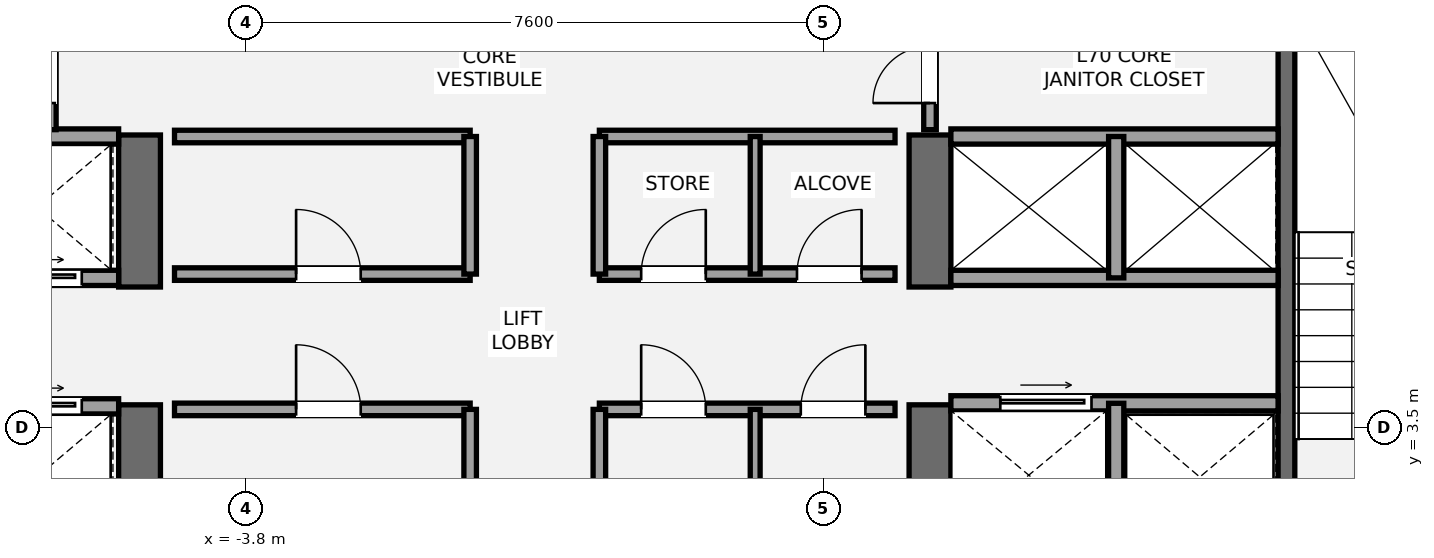
"""IFC4 building model, lengths in metres.
Left out: names, types, materials, properties, quantities, classifications, styles, units other than length and angle.
Written with IfcOpenShell. Run it as: python <this file> out.ifc"""

import sys

from ifc_helpers import new_model, si_unit, direction, frame, frame_2d, origin, place, context, subcontext, project, spatial, rectangle, extrude, element, fill, save


model = new_model("IFC4")
c1 = context("Model", 3, precision=1e-05, world=origin(), true_north=direction((0.0, 1.0)))
c2 = subcontext(c1, "Body", "Model", "MODEL_VIEW")
j1 = project(units=[si_unit("LENGTHUNIT", "METRE"), si_unit("PLANEANGLEUNIT", "RADIAN")], contexts=[c1])
p1 = place(None, origin())
s1 = spatial("IfcSite", under=j1, at=p1, CompositionType="ELEMENT")
p2 = place(p1, origin())
s2 = spatial("IfcBuilding", under=s1, at=p2, CompositionType="ELEMENT")
p3 = place(p2, frame((0.0, 0.0, 247.8)))
s3 = spatial("IfcBuildingStorey", under=s2, at=p3, CompositionType="ELEMENT", Elevation=247.8)
p4 = place(p3, frame((-5.2, 1.3, 0.0), z_axis=(0.0, 0.0, 1.0), x_axis=(0.0, 1.0, 0.0)))
e1 = element("IfcWall", 1, at=p4, inside=s3, PredefinedType="SHEAR", context=c2, shape_type="SweptSolid", body=[
    extrude(rectangle(XDim=2.5, YDim=0.55, at=frame_2d((1.25, 0.0))), origin(), (0.0, 0.0, 1.0), 3.15),
])
p5 = place(p3, frame((-5.2, 5.35, 0.0), z_axis=(0.0, 0.0, 1.0), x_axis=(0.0, 1.0, 0.0)))
e2 = element("IfcWall", 2, at=p5, inside=s3, PredefinedType="SHEAR", context=c2, shape_type="SweptSolid", body=[
    extrude(rectangle(XDim=2.0, YDim=0.55, at=frame_2d((1.0, 0.0))), origin(), (0.0, 0.0, 1.0), 3.15),
])
p6 = place(p3, frame((5.2, 1.3, 0.0), z_axis=(0.0, 0.0, 1.0), x_axis=(0.0, 1.0, 0.0)))
e3 = element("IfcWall", 3, at=p6, inside=s3, PredefinedType="SHEAR", context=c2, shape_type="SweptSolid", body=[
    extrude(rectangle(XDim=2.5, YDim=0.55, at=frame_2d((1.25, 0.0))), origin(), (0.0, 0.0, 1.0), 3.15),
])
p7 = place(p3, frame((5.2, 5.35, 0.0), z_axis=(0.0, 0.0, 1.0), x_axis=(0.0, 1.0, 0.0)))
e4 = element("IfcWall", 4, at=p7, inside=s3, PredefinedType="SHEAR", context=c2, shape_type="SweptSolid", body=[
    extrude(rectangle(XDim=2.0, YDim=0.55, at=frame_2d((1.0, 0.0))), origin(), (0.0, 0.0, 1.0), 3.15),
])
p8 = place(p3, frame((9.89, 1.85, 0.0), z_axis=(0.0, 0.0, 1.0), x_axis=(0.0, 1.0, 0.0)))
e5 = element("IfcWall", 5, at=p8, inside=s3, PredefinedType="SHEAR", context=c2, shape_type="SweptSolid", body=[
    extrude(rectangle(XDim=7.15, YDim=0.22, at=frame_2d((3.575, 0.0))), origin(), (0.0, 0.0, 1.0), 3.15),
])
p9 = place(p3, frame((-9.78, 3.78, 0.0), z_axis=(0.0, 0.0, 1.0), x_axis=(1.0, 0.0, 0.0)))
e6 = element("IfcWall", 6, at=p9, inside=s3, PredefinedType="SOLIDWALL", context=c2, shape_type="SweptSolid", body=[
    extrude(rectangle(XDim=4.305, YDim=0.2, at=frame_2d((2.152, 0.0))), origin(), (0.0, 0.0, 1.0), 2.97),
])
p10 = place(p9, frame((2.72, 0.0, 0.0)))
e7 = element("IfcOpeningElement", 7, at=p10, cuts=e6, PredefinedType="OPENING", context=c2, shape_type="SweptSolid", body=[
    extrude(rectangle(XDim=1.1, YDim=2.2, at=frame_2d((0.55, 1.1))), frame((0.0, 0.11, 0.0), z_axis=(0.0, -1.0, 0.0), x_axis=(1.0, 0.0, 0.0)), (0.0, 0.0, 1.0), 0.22),
])
p11 = place(p3, frame((-9.78, 5.47, 0.0), z_axis=(0.0, 0.0, 1.0), x_axis=(1.0, 0.0, 0.0)))
e8 = element("IfcWall", 8, at=p11, inside=s3, PredefinedType="SOLIDWALL", context=c2, shape_type="SweptSolid", body=[
    extrude(rectangle(XDim=4.305, YDim=0.2, at=frame_2d((2.152, 0.0))), origin(), (0.0, 0.0, 1.0), 2.97),
])
p12 = place(p11, frame((0.55, 0.0, 0.0)))
e9 = element("IfcOpeningElement", 9, at=p12, cuts=e8, PredefinedType="OPENING", context=c2, shape_type="SweptSolid", body=[
    extrude(rectangle(XDim=1.1, YDim=2.2, at=frame_2d((0.55, 1.1))), frame((0.0, 0.11, 0.0), z_axis=(0.0, -1.0, 0.0), x_axis=(1.0, 0.0, 0.0)), (0.0, 0.0, 1.0), 0.22),
])
p13 = place(p11, frame((2.72, 0.0, 0.0)))
e10 = element("IfcOpeningElement", 10, at=p13, cuts=e8, PredefinedType="OPENING", context=c2, shape_type="SweptSolid", body=[
    extrude(rectangle(XDim=1.1, YDim=2.2, at=frame_2d((0.55, 1.1))), frame((0.0, 0.11, 0.0), z_axis=(0.0, -1.0, 0.0), x_axis=(1.0, 0.0, 0.0)), (0.0, 0.0, 1.0), 0.22),
])
p14 = place(p3, frame((-9.78, 7.33, 0.0), z_axis=(0.0, 0.0, 1.0), x_axis=(1.0, 0.0, 0.0)))
e11 = element("IfcWall", 11, at=p14, inside=s3, PredefinedType="SOLIDWALL", context=c2, shape_type="SweptSolid", body=[
    extrude(rectangle(XDim=4.305, YDim=0.2, at=frame_2d((2.152, 0.0))), origin(), (0.0, 0.0, 1.0), 2.97),
])
p15 = place(p3, frame((5.475, 3.82, 0.0), z_axis=(0.0, 0.0, 1.0), x_axis=(1.0, 0.0, 0.0)))
e12 = element("IfcWall", 12, at=p15, inside=s3, PredefinedType="SOLIDWALL", context=c2, shape_type="SweptSolid", body=[
    extrude(rectangle(XDim=4.305, YDim=0.2, at=frame_2d((2.152, 0.0))), origin(), (0.0, 0.0, 1.0), 2.97),
])
p16 = place(p15, frame((0.65, 0.0, 0.0)))
e13 = element("IfcOpeningElement", 13, at=p16, cuts=e12, PredefinedType="OPENING", context=c2, shape_type="SweptSolid", body=[
    extrude(rectangle(XDim=1.2, YDim=2.2, at=frame_2d((0.6, 1.1))), frame((0.0, 0.11, 0.0), z_axis=(0.0, -1.0, 0.0), x_axis=(1.0, 0.0, 0.0)), (0.0, 0.0, 1.0), 0.22),
])
p17 = place(p3, frame((7.65, 1.85, 0.0), z_axis=(0.0, 0.0, 1.0), x_axis=(0.0, 1.0, 0.0)))
e14 = element("IfcWall", 14, at=p17, inside=s3, PredefinedType="SOLIDWALL", context=c2, shape_type="SweptSolid", body=[
    extrude(rectangle(XDim=1.97, YDim=0.2, at=frame_2d((0.985, 0.0))), origin(), (0.0, 0.0, 1.0), 2.97),
])
for number, where, z_axis, x_axis in (
    (15, (5.475, 5.47, 0.0), (0.0, 0.0, 1.0), (1.0, 0.0, 0.0)),
    (16, (5.475, 7.33, 0.0), (0.0, 0.0, 1.0), (1.0, 0.0, 0.0)),
):
    element("IfcWall", number, at=place(p3, frame(where, z_axis=z_axis, x_axis=x_axis)), inside=s3, PredefinedType="SOLIDWALL", context=c2, shape_type="SweptSolid", body=[
        extrude(rectangle(XDim=4.305, YDim=0.2, at=frame_2d((2.152, 0.0))), origin(), (0.0, 0.0, 1.0), 2.97),
    ])
p18 = place(p3, frame((7.65, 5.47, 0.0), z_axis=(0.0, 0.0, 1.0), x_axis=(0.0, 1.0, 0.0)))
e17 = element("IfcWall", 17, at=p18, inside=s3, PredefinedType="SOLIDWALL", context=c2, shape_type="SweptSolid", body=[
    extrude(rectangle(XDim=1.86, YDim=0.2, at=frame_2d((0.93, 0.0))), origin(), (0.0, 0.0, 1.0), 2.97),
])
p19 = place(p3, frame((-4.74, 3.74, 0.0), z_axis=(0.0, 0.0, 1.0), x_axis=(1.0, 0.0, 0.0)))
e18 = element("IfcWall", 18, at=p19, inside=s3, PredefinedType="PARTITIONING", context=c2, shape_type="SweptSolid", body=[
    extrude(rectangle(XDim=3.89, YDim=0.165, at=frame_2d((1.945, 0.0))), origin(), (0.0, 0.0, 1.0), 2.97),
])
p20 = place(p19, frame((1.6, 0.0, 0.0)))
e19 = element("IfcOpeningElement", 19, at=p20, cuts=e18, PredefinedType="OPENING", context=c2, shape_type="SweptSolid", body=[
    extrude(rectangle(XDim=0.85, YDim=2.1, at=frame_2d((0.425, 1.05))), frame((0.0, 0.093, 0.0), z_axis=(0.0, -1.0, 0.0), x_axis=(1.0, 0.0, 0.0)), (0.0, 0.0, 1.0), 0.185),
])
p21 = place(p3, frame((-0.85, 1.92, 0.0), z_axis=(0.0, 0.0, 1.0), x_axis=(0.0, 1.0, 0.0)))
e20 = element("IfcWall", 20, at=p21, inside=s3, PredefinedType="PARTITIONING", context=c2, shape_type="SweptSolid", body=[
    extrude(rectangle(XDim=1.82, YDim=0.165, at=frame_2d((0.91, 0.0))), origin(), (0.0, 0.0, 1.0), 2.97),
])
p22 = place(p3, frame((0.85, 3.74, 0.0), z_axis=(0.0, 0.0, 1.0), x_axis=(1.0, 0.0, 0.0)))
e21 = element("IfcWall", 21, at=p22, inside=s3, PredefinedType="PARTITIONING", context=c2, shape_type="SweptSolid", body=[
    extrude(rectangle(XDim=3.89, YDim=0.165, at=frame_2d((1.945, 0.0))), origin(), (0.0, 0.0, 1.0), 2.97),
])
p23 = place(p22, frame((0.55, 0.0, 0.0)))
e22 = element("IfcOpeningElement", 22, at=p23, cuts=e21, PredefinedType="OPENING", context=c2, shape_type="SweptSolid", body=[
    extrude(rectangle(XDim=0.85, YDim=2.1, at=frame_2d((0.425, 1.05))), frame((0.0, 0.093, 0.0), z_axis=(0.0, -1.0, 0.0), x_axis=(1.0, 0.0, 0.0)), (0.0, 0.0, 1.0), 0.185),
])
p24 = place(p22, frame((2.65, 0.0, 0.0)))
e23 = element("IfcOpeningElement", 23, at=p24, cuts=e21, PredefinedType="OPENING", context=c2, shape_type="SweptSolid", body=[
    extrude(rectangle(XDim=0.85, YDim=2.1, at=frame_2d((0.425, 1.05))), frame((0.0, 0.093, 0.0), z_axis=(0.0, -1.0, 0.0), x_axis=(1.0, 0.0, 0.0)), (0.0, 0.0, 1.0), 0.185),
])
p25 = place(p3, frame((0.85, 1.92, 0.0), z_axis=(0.0, 0.0, 1.0), x_axis=(0.0, 1.0, 0.0)))
e24 = element("IfcWall", 24, at=p25, inside=s3, PredefinedType="PARTITIONING", context=c2, shape_type="SweptSolid", body=[
    extrude(rectangle(XDim=1.82, YDim=0.165, at=frame_2d((0.91, 0.0))), origin(), (0.0, 0.0, 1.0), 2.97),
])
p26 = place(p3, frame((2.9, 1.92, 0.0), z_axis=(0.0, 0.0, 1.0), x_axis=(0.0, 1.0, 0.0)))
e25 = element("IfcWall", 25, at=p26, inside=s3, PredefinedType="PARTITIONING", context=c2, shape_type="SweptSolid", body=[
    extrude(rectangle(XDim=1.82, YDim=0.13, at=frame_2d((0.91, 0.0))), origin(), (0.0, 0.0, 1.0), 2.97),
])
p27 = place(p3, frame((-4.74, 5.52, 0.0), z_axis=(0.0, 0.0, 1.0), x_axis=(1.0, 0.0, 0.0)))
e26 = element("IfcWall", 26, at=p27, inside=s3, PredefinedType="PARTITIONING", context=c2, shape_type="SweptSolid", body=[
    extrude(rectangle(XDim=3.89, YDim=0.165, at=frame_2d((1.945, 0.0))), origin(), (0.0, 0.0, 1.0), 2.97),
])
p28 = place(p27, frame((1.6, 0.0, 0.0)))
e27 = element("IfcOpeningElement", 27, at=p28, cuts=e26, PredefinedType="OPENING", context=c2, shape_type="SweptSolid", body=[
    extrude(rectangle(XDim=0.85, YDim=2.1, at=frame_2d((0.425, 1.05))), frame((0.0, 0.093, 0.0), z_axis=(0.0, -1.0, 0.0), x_axis=(1.0, 0.0, 0.0)), (0.0, 0.0, 1.0), 0.185),
])
p29 = place(p3, frame((-4.74, 7.33, 0.0), z_axis=(0.0, 0.0, 1.0), x_axis=(1.0, 0.0, 0.0)))
e28 = element("IfcWall", 28, at=p29, inside=s3, PredefinedType="PARTITIONING", context=c2, shape_type="SweptSolid", body=[
    extrude(rectangle(XDim=3.89, YDim=0.165, at=frame_2d((1.945, 0.0))), origin(), (0.0, 0.0, 1.0), 2.97),
])
p30 = place(p3, frame((-0.85, 5.52, 0.0), z_axis=(0.0, 0.0, 1.0), x_axis=(0.0, 1.0, 0.0)))
e29 = element("IfcWall", 29, at=p30, inside=s3, PredefinedType="PARTITIONING", context=c2, shape_type="SweptSolid", body=[
    extrude(rectangle(XDim=1.81, YDim=0.165, at=frame_2d((0.905, 0.0))), origin(), (0.0, 0.0, 1.0), 2.97),
])
p31 = place(p3, frame((0.85, 5.52, 0.0), z_axis=(0.0, 0.0, 1.0), x_axis=(1.0, 0.0, 0.0)))
e30 = element("IfcWall", 30, at=p31, inside=s3, PredefinedType="PARTITIONING", context=c2, shape_type="SweptSolid", body=[
    extrude(rectangle(XDim=3.89, YDim=0.165, at=frame_2d((1.945, 0.0))), origin(), (0.0, 0.0, 1.0), 2.97),
])
p32 = place(p31, frame((0.55, 0.0, 0.0)))
e31 = element("IfcOpeningElement", 31, at=p32, cuts=e30, PredefinedType="OPENING", context=c2, shape_type="SweptSolid", body=[
    extrude(rectangle(XDim=0.85, YDim=2.1, at=frame_2d((0.425, 1.05))), frame((0.0, 0.093, 0.0), z_axis=(0.0, -1.0, 0.0), x_axis=(1.0, 0.0, 0.0)), (0.0, 0.0, 1.0), 0.185),
])
p33 = place(p31, frame((2.6, 0.0, 0.0)))
e32 = element("IfcOpeningElement", 32, at=p33, cuts=e30, PredefinedType="OPENING", context=c2, shape_type="SweptSolid", body=[
    extrude(rectangle(XDim=0.85, YDim=2.1, at=frame_2d((0.425, 1.05))), frame((0.0, 0.093, 0.0), z_axis=(0.0, -1.0, 0.0), x_axis=(1.0, 0.0, 0.0)), (0.0, 0.0, 1.0), 0.185),
])
p34 = place(p3, frame((0.85, 7.33, 0.0), z_axis=(0.0, 0.0, 1.0), x_axis=(1.0, 0.0, 0.0)))
e33 = element("IfcWall", 33, at=p34, inside=s3, PredefinedType="PARTITIONING", context=c2, shape_type="SweptSolid", body=[
    extrude(rectangle(XDim=3.89, YDim=0.165, at=frame_2d((1.945, 0.0))), origin(), (0.0, 0.0, 1.0), 2.97),
])
p35 = place(p3, frame((0.85, 5.52, 0.0), z_axis=(0.0, 0.0, 1.0), x_axis=(0.0, 1.0, 0.0)))
e34 = element("IfcWall", 34, at=p35, inside=s3, PredefinedType="PARTITIONING", context=c2, shape_type="SweptSolid", body=[
    extrude(rectangle(XDim=1.81, YDim=0.165, at=frame_2d((0.905, 0.0))), origin(), (0.0, 0.0, 1.0), 2.97),
])
p36 = place(p3, frame((2.9, 5.52, 0.0), z_axis=(0.0, 0.0, 1.0), x_axis=(0.0, 1.0, 0.0)))
e35 = element("IfcWall", 35, at=p36, inside=s3, PredefinedType="PARTITIONING", context=c2, shape_type="SweptSolid", body=[
    extrude(rectangle(XDim=1.81, YDim=0.13, at=frame_2d((0.905, 0.0))), origin(), (0.0, 0.0, 1.0), 2.97),
])
p37 = place(p3, frame((-6.38, 7.42, 0.0), z_axis=(0.0, 0.0, 1.0), x_axis=(0.0, 1.0, 0.0)))
e36 = element("IfcWall", 36, at=p37, inside=s3, PredefinedType="PARTITIONING", context=c2, shape_type="SweptSolid", body=[
    extrude(rectangle(XDim=1.58, YDim=0.165, at=frame_2d((0.79, 0.0))), origin(), (0.0, 0.0, 1.0), 2.97),
])
p38 = place(p37, frame((0.35, 0.0, 0.0)))
e37 = element("IfcOpeningElement", 37, at=p38, cuts=e36, PredefinedType="OPENING", context=c2, shape_type="SweptSolid", body=[
    extrude(rectangle(XDim=0.75, YDim=2.1, at=frame_2d((0.375, 1.05))), frame((0.0, 0.093, 0.0), z_axis=(0.0, -1.0, 0.0), x_axis=(1.0, 0.0, 0.0)), (0.0, 0.0, 1.0), 0.185),
])
p39 = place(p3, frame((5.2, 7.42, 0.0), z_axis=(0.0, 0.0, 1.0), x_axis=(0.0, 1.0, 0.0)))
e38 = element("IfcWall", 38, at=p39, inside=s3, PredefinedType="PARTITIONING", context=c2, shape_type="SweptSolid", body=[
    extrude(rectangle(XDim=1.58, YDim=0.165, at=frame_2d((0.79, 0.0))), origin(), (0.0, 0.0, 1.0), 2.97),
])
p40 = place(p39, frame((0.35, 0.0, 0.0)))
e39 = element("IfcOpeningElement", 39, at=p40, cuts=e38, PredefinedType="OPENING", context=c2, shape_type="SweptSolid", body=[
    extrude(rectangle(XDim=0.75, YDim=2.1, at=frame_2d((0.375, 1.05))), frame((0.0, 0.093, 0.0), z_axis=(0.0, -1.0, 0.0), x_axis=(1.0, 0.0, 0.0)), (0.0, 0.0, 1.0), 0.185),
])
p41 = place(p13, origin())
e40 = element("IfcDoor", 40, at=p41, inside=s3, OperationType="SLIDING_TO_LEFT", PredefinedType="DOOR", context=c2, shape_type="SweptSolid", body=[
    extrude(rectangle(XDim=1.1, YDim=2.2, at=frame_2d((0.55, 1.1))), frame((0.0, 0.025, 0.0), z_axis=(0.0, -1.0, 0.0), x_axis=(1.0, 0.0, 0.0)), (0.0, 0.0, 1.0), 0.05),
])
fill(e10, e40)
p42 = place(p10, origin())
e41 = element("IfcDoor", 41, at=p42, inside=s3, OperationType="SLIDING_TO_LEFT", PredefinedType="DOOR", context=c2, shape_type="SweptSolid", body=[
    extrude(rectangle(XDim=1.1, YDim=2.2, at=frame_2d((0.55, 1.1))), frame((0.0, 0.025, 0.0), z_axis=(0.0, -1.0, 0.0), x_axis=(1.0, 0.0, 0.0)), (0.0, 0.0, 1.0), 0.05),
])
fill(e7, e41)
p43 = place(p16, origin())
e42 = element("IfcDoor", 42, at=p43, inside=s3, OperationType="SLIDING_TO_RIGHT", PredefinedType="DOOR", context=c2, shape_type="SweptSolid", body=[
    extrude(rectangle(XDim=1.2, YDim=2.2, at=frame_2d((0.6, 1.1))), frame((0.0, 0.025, 0.0), z_axis=(0.0, -1.0, 0.0), x_axis=(1.0, 0.0, 0.0)), (0.0, 0.0, 1.0), 0.05),
])
fill(e13, e42)
p44 = place(p20, origin())
e43 = element("IfcDoor", 43, at=p44, inside=s3, OperationType="SINGLE_SWING_LEFT", PredefinedType="DOOR", context=c2, shape_type="SweptSolid", body=[
    extrude(rectangle(XDim=0.85, YDim=2.1, at=frame_2d((0.425, 1.05))), frame((0.0, 0.025, 0.0), z_axis=(0.0, -1.0, 0.0), x_axis=(1.0, 0.0, 0.0)), (0.0, 0.0, 1.0), 0.05),
])
fill(e19, e43)
p45 = place(p23, origin())
e44 = element("IfcDoor", 44, at=p45, inside=s3, OperationType="SINGLE_SWING_LEFT", PredefinedType="DOOR", context=c2, shape_type="SweptSolid", body=[
    extrude(rectangle(XDim=0.85, YDim=2.1, at=frame_2d((0.425, 1.05))), frame((0.0, 0.025, 0.0), z_axis=(0.0, -1.0, 0.0), x_axis=(1.0, 0.0, 0.0)), (0.0, 0.0, 1.0), 0.05),
])
fill(e22, e44)
p46 = place(p24, origin())
e45 = element("IfcDoor", 45, at=p46, inside=s3, OperationType="SINGLE_SWING_RIGHT", PredefinedType="DOOR", context=c2, shape_type="SweptSolid", body=[
    extrude(rectangle(XDim=0.85, YDim=2.1, at=frame_2d((0.425, 1.05))), frame((0.0, 0.025, 0.0), z_axis=(0.0, -1.0, 0.0), x_axis=(1.0, 0.0, 0.0)), (0.0, 0.0, 1.0), 0.05),
])
fill(e23, e45)
p47 = place(p28, origin())
e46 = element("IfcDoor", 46, at=p47, inside=s3, OperationType="SINGLE_SWING_LEFT", PredefinedType="DOOR", context=c2, shape_type="SweptSolid", body=[
    extrude(rectangle(XDim=0.85, YDim=2.1, at=frame_2d((0.425, 1.05))), frame((0.0, 0.025, 0.0), z_axis=(0.0, -1.0, 0.0), x_axis=(1.0, 0.0, 0.0)), (0.0, 0.0, 1.0), 0.05),
])
fill(e27, e46)
p48 = place(p32, origin())
e47 = element("IfcDoor", 47, at=p48, inside=s3, OperationType="SINGLE_SWING_RIGHT", PredefinedType="DOOR", context=c2, shape_type="SweptSolid", body=[
    extrude(rectangle(XDim=0.85, YDim=2.1, at=frame_2d((0.425, 1.05))), frame((0.0, 0.025, 0.0), z_axis=(0.0, -1.0, 0.0), x_axis=(1.0, 0.0, 0.0)), (0.0, 0.0, 1.0), 0.05),
])
fill(e31, e47)
p49 = place(p33, origin())
e48 = element("IfcDoor", 48, at=p49, inside=s3, OperationType="SINGLE_SWING_RIGHT", PredefinedType="DOOR", context=c2, shape_type="SweptSolid", body=[
    extrude(rectangle(XDim=0.85, YDim=2.1, at=frame_2d((0.425, 1.05))), frame((0.0, 0.025, 0.0), z_axis=(0.0, -1.0, 0.0), x_axis=(1.0, 0.0, 0.0)), (0.0, 0.0, 1.0), 0.05),
])
fill(e32, e48)
p50 = place(p40, origin())
e49 = element("IfcDoor", 49, at=p50, inside=s3, OperationType="SINGLE_SWING_LEFT", PredefinedType="DOOR", context=c2, shape_type="SweptSolid", body=[
    extrude(rectangle(XDim=0.75, YDim=2.1, at=frame_2d((0.375, 1.05))), frame((0.0, 0.025, 0.0), z_axis=(0.0, -1.0, 0.0), x_axis=(1.0, 0.0, 0.0)), (0.0, 0.0, 1.0), 0.05),
])
fill(e39, e49)
save(model, sys.argv[1])
